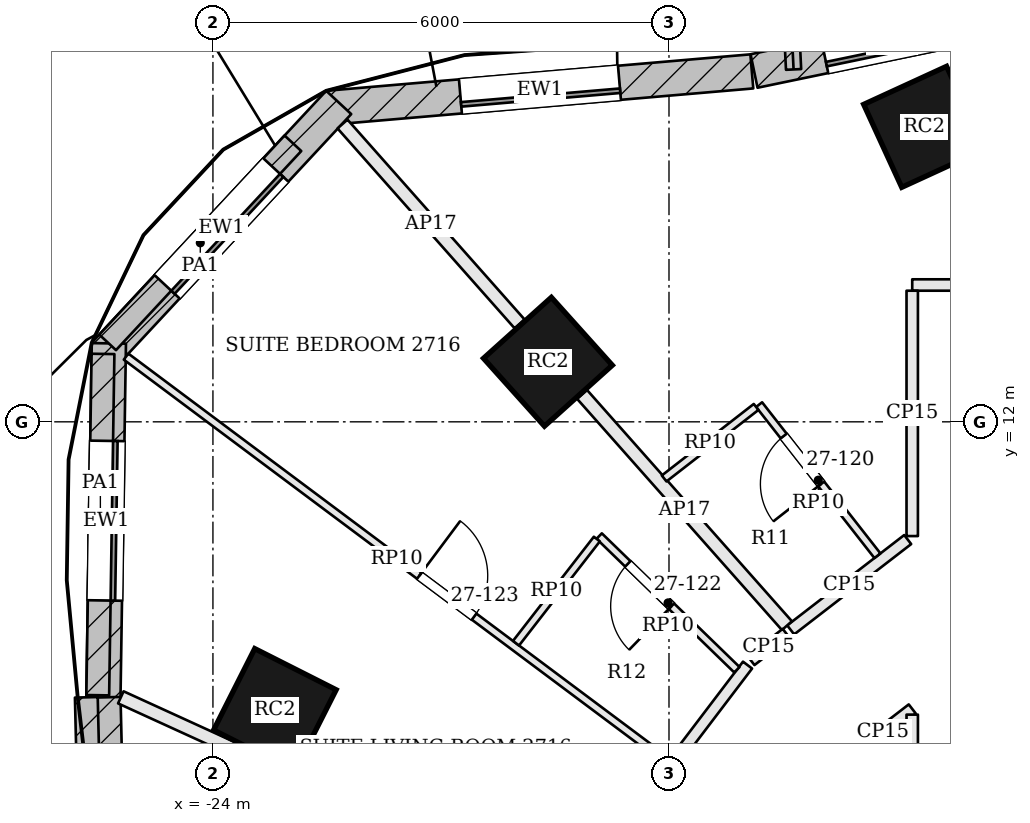
"""IFC4 building model, lengths in metres.
Left out: names, types, materials, properties, quantities, classifications, styles, units other than length and angle.
Written with IfcOpenShell. Run it as: python <this file> out.ifc"""

import sys

from ifc_helpers import new_model, si_unit, direction, frame, frame_2d, origin, origin_2d, place, context, subcontext, project, spatial, rectangle, extrude, element, fill, save


model = new_model("IFC4")
c1 = context("Model", 3, precision=1e-05, world=origin(), true_north=direction((0.0, 1.0)))
c2 = subcontext(c1, "Body", "Model", "MODEL_VIEW")
j1 = project(units=[si_unit("LENGTHUNIT", "METRE"), si_unit("PLANEANGLEUNIT", "RADIAN")], contexts=[c1])
p1 = place(None, origin())
s1 = spatial("IfcSite", under=j1, at=p1, CompositionType="ELEMENT")
p2 = place(p1, origin())
s2 = spatial("IfcBuilding", under=s1, at=p2, CompositionType="ELEMENT")
p3 = place(p2, frame((0.0, 0.0, 114.0)))
s3 = spatial("IfcBuildingStorey", under=s2, at=p3, CompositionType="ELEMENT", Elevation=114.0)
for number, where, z_axis, x_axis in (
    (1, (-14.643, 15.881, 0.0), (0.0, 0.0, 1.0), (-0.909, -0.417, 0.0)),
    (2, (-19.593, 12.79, 0.0), (0.0, 0.0, 1.0), (-0.744, -0.668, 0.0)),
    (3, (-23.185, 8.21, 0.0), (0.0, 0.0, 1.0), (-0.451, -0.893, 0.0)),
):
    element("IfcColumn", number, at=place(p3, frame(where, z_axis=z_axis, x_axis=x_axis)), inside=s3, PredefinedType="COLUMN", context=c2, shape_type="SweptSolid", body=[
        extrude(rectangle(XDim=1.2, YDim=1.2, at=origin_2d()), origin(), (0.0, 0.0, 1.0), 3.6),
    ])
p4 = place(p3, frame((-13.258, 17.367, 0.0), z_axis=(0.0, 0.0, 1.0), x_axis=(-0.97914968674, -0.203140077183, 0.0)))
e4 = element("IfcWall", 4, at=p4, inside=s3, PredefinedType="SOLIDWALL", context=c2, shape_type="SweptSolid", body=[
    extrude(rectangle(XDim=3.7, YDim=0.45, at=frame_2d((1.85, 0.0))), origin(), (0.0, 0.0, 1.0), 3.4),
])
p5 = place(p4, frame((0.95, 0.0, 0.9)))
e5 = element("IfcOpeningElement", 5, at=p5, cuts=e4, PredefinedType="OPENING", context=c2, shape_type="SweptSolid", body=[
    extrude(rectangle(XDim=1.8, YDim=2.0, at=frame_2d((0.9, 1.0))), frame((0.0, 0.235, 0.0), z_axis=(0.0, -1.0, 0.0), x_axis=(1.0, 0.0, 0.0)), (0.0, 0.0, 1.0), 0.47),
])
p6 = place(p3, frame((-16.91, 16.61, 0.0), z_axis=(0.0, 0.0, 1.0), x_axis=(-0.996333165816, -0.085558299972, 0.0)))
e6 = element("IfcWall", 6, at=p6, inside=s3, PredefinedType="SOLIDWALL", context=c2, shape_type="SweptSolid", body=[
    extrude(rectangle(XDim=5.596, YDim=0.45, at=frame_2d((2.798, 0.0))), origin(), (0.0, 0.0, 1.0), 3.4),
])
p7 = place(p6, frame((1.748, 0.0, 0.9)))
e7 = element("IfcOpeningElement", 7, at=p7, cuts=e6, PredefinedType="OPENING", context=c2, shape_type="SweptSolid", body=[
    extrude(rectangle(XDim=2.1, YDim=2.0, at=frame_2d((1.05, 1.0))), frame((0.0, 0.235, 0.0), z_axis=(0.0, -1.0, 0.0), x_axis=(1.0, 0.0, 0.0)), (0.0, 0.0, 1.0), 0.47),
])
p8 = place(p3, frame((-22.345, 16.202, 0.0), z_axis=(0.0, 0.0, 1.0), x_axis=(-0.681249161265, -0.732051624051, 0.0)))
e8 = element("IfcWall", 8, at=p8, inside=s3, PredefinedType="SOLIDWALL", context=c2, shape_type="SweptSolid", body=[
    extrude(rectangle(XDim=4.527, YDim=0.45, at=frame_2d((2.263, 0.0))), origin(), (0.0, 0.0, 1.0), 3.4),
])
p9 = place(p8, frame((1.213, 0.0, 0.9)))
e9 = element("IfcOpeningElement", 9, at=p9, cuts=e8, PredefinedType="OPENING", context=c2, shape_type="SweptSolid", body=[
    extrude(rectangle(XDim=2.1, YDim=2.0, at=frame_2d((1.05, 1.0))), frame((0.0, 0.235, 0.0), z_axis=(0.0, -1.0, 0.0), x_axis=(1.0, 0.0, 0.0)), (0.0, 0.0, 1.0), 0.47),
])
p10 = place(p3, frame((-25.369, 13.032, 0.0), z_axis=(0.0, 0.0, 1.0), x_axis=(-0.015383599855, -0.999881665426, 0.0)))
e10 = element("IfcWall", 10, at=p10, inside=s3, PredefinedType="SOLIDWALL", context=c2, shape_type="SweptSolid", body=[
    extrude(rectangle(XDim=4.666, YDim=0.45, at=frame_2d((2.333, 0.0))), origin(), (0.0, 0.0, 1.0), 3.4),
])
p11 = place(p10, frame((1.283, 0.0, 0.9)))
e11 = element("IfcOpeningElement", 11, at=p11, cuts=e10, PredefinedType="OPENING", context=c2, shape_type="SweptSolid", body=[
    extrude(rectangle(XDim=2.1, YDim=2.0, at=frame_2d((1.05, 1.0))), frame((0.0, 0.235, 0.0), z_axis=(0.0, -1.0, 0.0), x_axis=(1.0, 0.0, 0.0)), (0.0, 0.0, 1.0), 0.47),
])
p12 = place(p3, frame((-25.441, 8.375, 0.0), z_axis=(0.0, 0.0, 1.0), x_axis=(0.024385850259, -0.999702620936, 0.0)))
e12 = element("IfcWall", 12, at=p12, inside=s3, PredefinedType="SOLIDWALL", context=c2, shape_type="SweptSolid", body=[
    extrude(rectangle(XDim=4.165, YDim=0.45, at=frame_2d((2.083, 0.0))), origin(), (0.0, 0.0, 1.0), 3.4),
])
p13 = place(p12, frame((1.032, 0.0, 0.9)))
e13 = element("IfcOpeningElement", 13, at=p13, cuts=e12, PredefinedType="OPENING", context=c2, shape_type="SweptSolid", body=[
    extrude(rectangle(XDim=2.1, YDim=2.0, at=frame_2d((1.05, 1.0))), frame((0.0, 0.235, 0.0), z_axis=(0.0, -1.0, 0.0), x_axis=(1.0, 0.0, 0.0)), (0.0, 0.0, 1.0), 0.47),
])
p14 = place(p3, frame((-16.361, 16.636, 0.0), z_axis=(0.0, 0.0, 1.0), x_axis=(-0.048552811097, 0.998820616795, 0.0)))
e14 = element("IfcWall", 14, at=p14, inside=s3, PredefinedType="SOLIDWALL", context=c2, shape_type="SweptSolid", body=[
    extrude(rectangle(XDim=1.75, YDim=0.2, at=frame_2d((0.875, 0.0))), origin(), (0.0, 0.0, 1.0), 3.4),
])
p15 = place(p3, frame((-22.948, 15.665, 3.6), z_axis=(0.0, 0.0, 1.0), x_axis=(-0.681269800001, -0.732032417046, 0.0)))
e15 = element("IfcWall", 15, at=p15, inside=s3, PredefinedType="PARAPET", context=c2, shape_type="SweptSolid", body=[
    extrude(rectangle(XDim=3.578, YDim=0.3, at=frame_2d((1.789, 0.0))), origin(), (0.0, 0.0, 1.0), 1.1),
])
p16 = place(p3, frame((-25.446, 12.893, 3.6), z_axis=(0.0, 0.0, 1.0), x_axis=(-0.015386139974, -0.999881626342, 0.0)))
e16 = element("IfcWall", 16, at=p16, inside=s3, PredefinedType="PARAPET", context=c2, shape_type="SweptSolid", body=[
    extrude(rectangle(XDim=4.49, YDim=0.3, at=frame_2d((2.245, 0.0))), origin(), (0.0, 0.0, 1.0), 1.1),
])
p17 = place(p3, frame((-25.666, 8.376, 3.6), z_axis=(0.0, 0.0, 1.0), x_axis=(0.024357650064, -0.999703308429, 0.0)))
e17 = element("IfcWall", 17, at=p17, inside=s3, PredefinedType="PARAPET", context=c2, shape_type="SweptSolid", body=[
    extrude(rectangle(XDim=1.644, YDim=0.3, at=frame_2d((0.822, 0.0))), origin(), (0.0, 0.0, 1.0), 1.1),
])
p18 = place(p3, frame((-6.123, 13.8, 0.0), z_axis=(0.0, 0.0, 1.0), x_axis=(-1.0, 0.0, 0.0)))
e18 = element("IfcWall", 18, at=p18, inside=s3, PredefinedType="PARTITIONING", context=c2, shape_type="SweptSolid", body=[
    extrude(rectangle(XDim=8.677, YDim=0.15, at=frame_2d((4.339, 0.0))), origin(), (0.0, 0.0, 1.0), 2.784),
])
p19 = place(p18, frame((5.763, 0.0, 0.0)))
e19 = element("IfcOpeningElement", 19, at=p19, cuts=e18, PredefinedType="OPENING", context=c2, shape_type="SweptSolid", body=[
    extrude(rectangle(XDim=0.9, YDim=2.4, at=frame_2d((0.45, 1.2))), frame((0.0, 0.085, 0.0), z_axis=(0.0, -1.0, 0.0), x_axis=(1.0, 0.0, 0.0)), (0.0, 0.0, 1.0), 0.17),
])
p20 = place(p3, frame((-14.8, 13.725, 0.0), z_axis=(0.0, 0.0, 1.0), x_axis=(0.0, -1.0, 0.0)))
e20 = element("IfcWall", 20, at=p20, inside=s3, PredefinedType="PARTITIONING", context=c2, shape_type="SweptSolid", body=[
    extrude(rectangle(XDim=3.228, YDim=0.15, at=frame_2d((1.614, 0.0))), origin(), (0.0, 0.0, 1.0), 2.784),
])
p21 = place(p3, frame((-14.86, 10.451, 0.0), z_axis=(0.0, 0.0, 1.0), x_axis=(-0.791530658389, -0.611129459959, 0.0)))
e21 = element("IfcWall", 21, at=p21, inside=s3, PredefinedType="PARTITIONING", context=c2, shape_type="SweptSolid", body=[
    extrude(rectangle(XDim=1.945, YDim=0.15, at=frame_2d((0.972, 0.0))), origin(), (0.0, 0.0, 1.0), 2.784),
])
p22 = place(p3, frame((-22.295, 15.918, 0.0), z_axis=(0.0, 0.0, 1.0), x_axis=(0.663107572679, -0.748524112541, 0.0)))
e22 = element("IfcWall", 22, at=p22, inside=s3, PredefinedType="PARTITIONING", context=c2, shape_type="SweptSolid", body=[
    extrude(rectangle(XDim=3.513, YDim=0.175, at=frame_2d((1.756, 0.0))), origin(), (0.0, 0.0, 1.0), 2.784),
])
p23 = place(p3, frame((-19.143, 12.36, 0.0), z_axis=(0.0, 0.0, 1.0), x_axis=(0.663132391124, -0.748502125476, 0.0)))
e23 = element("IfcWall", 23, at=p23, inside=s3, PredefinedType="PARTITIONING", context=c2, shape_type="SweptSolid", body=[
    extrude(rectangle(XDim=4.064, YDim=0.175, at=frame_2d((2.032, 0.0))), origin(), (0.0, 0.0, 1.0), 2.784),
])
p24 = place(p3, frame((-16.458, 9.217, 0.0), z_axis=(0.0, 0.0, 1.0), x_axis=(-0.791661143807, -0.610960418837, 0.0)))
e24 = element("IfcWall", 24, at=p24, inside=s3, PredefinedType="PARTITIONING", context=c2, shape_type="SweptSolid", body=[
    extrude(rectangle(XDim=0.585, YDim=0.15, at=frame_2d((0.292, 0.0))), origin(), (0.0, 0.0, 1.0), 2.784),
])
p25 = place(p3, frame((-16.967, 8.8, 0.0), z_axis=(0.0, 0.0, 1.0), x_axis=(-0.604991921991, -0.796231608469, 0.0)))
e25 = element("IfcWall", 25, at=p25, inside=s3, PredefinedType="PARTITIONING", context=c2, shape_type="SweptSolid", body=[
    extrude(rectangle(XDim=3.185, YDim=0.15, at=frame_2d((1.593, 0.0))), origin(), (0.0, 0.0, 1.0), 2.784),
])
p26 = place(p25, frame((1.935, 0.0, 0.0)))
e26 = element("IfcOpeningElement", 26, at=p26, cuts=e25, PredefinedType="OPENING", context=c2, shape_type="SweptSolid", body=[
    extrude(rectangle(XDim=1.0, YDim=2.1, at=frame_2d((0.5, 1.05))), frame((0.0, 0.085, 0.0), z_axis=(0.0, -1.0, 0.0), x_axis=(1.0, 0.0, 0.0)), (0.0, 0.0, 1.0), 0.17),
])
p27 = place(p3, frame((-25.212, 8.375, 0.0), z_axis=(0.0, 0.0, 1.0), x_axis=(0.909561207786, -0.415569981219, 0.0)))
e27 = element("IfcWall", 27, at=p27, inside=s3, PredefinedType="PARTITIONING", context=c2, shape_type="SweptSolid", body=[
    extrude(rectangle(XDim=6.628, YDim=0.175, at=frame_2d((3.314, 0.0))), origin(), (0.0, 0.0, 1.0), 2.784),
])
p28 = place(p3, frame((-15.573, 7.626, 0.0), z_axis=(0.0, 0.0, 1.0), x_axis=(0.791581834002, 0.611063171921, 0.0)))
e28 = element("IfcWall", 28, at=p28, inside=s3, PredefinedType="PARTITIONING", context=c2, shape_type="SweptSolid", body=[
    extrude(rectangle(XDim=0.977, YDim=0.15, at=frame_2d((0.488, 0.0))), origin(), (0.0, 0.0, 1.0), 2.784),
])
p29 = place(p3, frame((-14.8, 8.148, 0.0), z_axis=(0.0, 0.0, 1.0), x_axis=(0.0, -1.0, 0.0)))
e29 = element("IfcWall", 29, at=p29, inside=s3, PredefinedType="PARTITIONING", context=c2, shape_type="SweptSolid", body=[
    extrude(rectangle(XDim=12.948, YDim=0.15, at=frame_2d((6.474, 0.0))), origin(), (0.0, 0.0, 1.0), 2.784),
])
p30 = place(p29, frame((5.536, 0.0, 0.0)))
e30 = element("IfcOpeningElement", 30, at=p30, cuts=e29, PredefinedType="OPENING", context=c2, shape_type="SweptSolid", body=[
    extrude(rectangle(XDim=1.8, YDim=2.1, at=frame_2d((0.9, 1.05))), frame((0.0, 0.085, 0.0), z_axis=(0.0, -1.0, 0.0), x_axis=(1.0, 0.0, 0.0)), (0.0, 0.0, 1.0), 0.17),
])
p31 = place(p3, frame((-15.258, 10.238, 0.0), z_axis=(0.0, 0.0, 1.0), x_axis=(-0.616501171545, 0.787353989946, 0.0)))
e31 = element("IfcWall", 31, at=p31, inside=s3, PredefinedType="PARTITIONING", context=c2, shape_type="SweptSolid", body=[
    extrude(rectangle(XDim=2.525, YDim=0.1, at=frame_2d((1.262, 0.0))), origin(), (0.0, 0.0, 1.0), 2.884),
])
p32 = place(p31, frame((1.2, 0.0, 0.0)))
e32 = element("IfcOpeningElement", 32, at=p32, cuts=e31, PredefinedType="OPENING", context=c2, shape_type="SweptSolid", body=[
    extrude(rectangle(XDim=0.8, YDim=2.1, at=frame_2d((0.4, 1.05))), frame((0.0, 0.06, 0.0), z_axis=(0.0, -1.0, 0.0), x_axis=(1.0, 0.0, 0.0)), (0.0, 0.0, 1.0), 0.12),
])
p33 = place(p3, frame((-16.854, 12.196, 0.0), z_axis=(0.0, 0.0, 1.0), x_axis=(-0.789403675078, -0.613874447891, 0.0)))
e33 = element("IfcWall", 33, at=p33, inside=s3, PredefinedType="PARTITIONING", context=c2, shape_type="SweptSolid", body=[
    extrude(rectangle(XDim=1.533, YDim=0.1, at=frame_2d((0.766, 0.0))), origin(), (0.0, 0.0, 1.0), 2.884),
])
p34 = place(p3, frame((-25.143, 12.858, 0.0), z_axis=(0.0, 0.0, 1.0), x_axis=(0.801115721268, -0.598509482913, 0.0)))
e34 = element("IfcWall", 34, at=p34, inside=s3, PredefinedType="PARTITIONING", context=c2, shape_type="SweptSolid", body=[
    extrude(rectangle(XDim=8.89, YDim=0.1, at=frame_2d((4.445, 0.0))), origin(), (0.0, 0.0, 1.0), 2.884),
])
p35 = place(p34, frame((4.816, 0.0, 0.0)))
e35 = element("IfcOpeningElement", 35, at=p35, cuts=e34, PredefinedType="OPENING", context=c2, shape_type="SweptSolid", body=[
    extrude(rectangle(XDim=0.9, YDim=2.4, at=frame_2d((0.45, 1.2))), frame((0.0, 0.06, 0.0), z_axis=(0.0, -1.0, 0.0), x_axis=(1.0, 0.0, 0.0)), (0.0, 0.0, 1.0), 0.12),
])
p36 = place(p3, frame((-17.107, 8.738, 0.0), z_axis=(0.0, 0.0, 1.0), x_axis=(-0.717471254284, 0.696588113074, 0.0)))
e36 = element("IfcWall", 36, at=p36, inside=s3, PredefinedType="PARTITIONING", context=c2, shape_type="SweptSolid", body=[
    extrude(rectangle(XDim=2.525, YDim=0.1, at=frame_2d((1.263, 0.0))), origin(), (0.0, 0.0, 1.0), 2.884),
])
p37 = place(p36, frame((1.2, 0.0, 0.0)))
e37 = element("IfcOpeningElement", 37, at=p37, cuts=e36, PredefinedType="OPENING", context=c2, shape_type="SweptSolid", body=[
    extrude(rectangle(XDim=0.8, YDim=2.1, at=frame_2d((0.4, 1.05))), frame((0.0, 0.06, 0.0), z_axis=(0.0, -1.0, 0.0), x_axis=(1.0, 0.0, 0.0)), (0.0, 0.0, 1.0), 0.12),
])
p38 = place(p3, frame((-18.949, 10.458, 0.0), z_axis=(0.0, 0.0, 1.0), x_axis=(-0.613092531391, -0.790011106221, 0.0)))
e38 = element("IfcWall", 38, at=p38, inside=s3, PredefinedType="PARTITIONING", context=c2, shape_type="SweptSolid", body=[
    extrude(rectangle(XDim=1.735, YDim=0.1, at=frame_2d((0.867, 0.0))), origin(), (0.0, 0.0, 1.0), 2.884),
])
p39 = place(p5, origin())
e39 = element("IfcWindow", 39, at=p39, inside=s3, PartitioningType="SINGLE_PANEL", PredefinedType="WINDOW", context=c2, shape_type="SweptSolid", body=[
    extrude(rectangle(XDim=1.8, YDim=2.0, at=frame_2d((0.9, 1.0))), frame((0.0, 0.135, 0.0), z_axis=(0.0, -1.0, 0.0), x_axis=(1.0, 0.0, 0.0)), (0.0, 0.0, 1.0), 0.06),
])
fill(e5, e39)
p40 = place(p7, origin())
e40 = element("IfcWindow", 40, at=p40, inside=s3, PartitioningType="SINGLE_PANEL", PredefinedType="WINDOW", context=c2, shape_type="SweptSolid", body=[
    extrude(rectangle(XDim=2.1, YDim=2.0, at=frame_2d((1.05, 1.0))), frame((0.0, 0.135, 0.0), z_axis=(0.0, -1.0, 0.0), x_axis=(1.0, 0.0, 0.0)), (0.0, 0.0, 1.0), 0.06),
])
fill(e7, e40)
p41 = place(p9, origin())
e41 = element("IfcWindow", 41, at=p41, inside=s3, PartitioningType="SINGLE_PANEL", PredefinedType="WINDOW", context=c2, shape_type="SweptSolid", body=[
    extrude(rectangle(XDim=2.1, YDim=2.0, at=frame_2d((1.05, 1.0))), frame((0.0, 0.135, 0.0), z_axis=(0.0, -1.0, 0.0), x_axis=(1.0, 0.0, 0.0)), (0.0, 0.0, 1.0), 0.06),
])
fill(e9, e41)
p42 = place(p11, origin())
e42 = element("IfcWindow", 42, at=p42, inside=s3, PartitioningType="SINGLE_PANEL", PredefinedType="WINDOW", context=c2, shape_type="SweptSolid", body=[
    extrude(rectangle(XDim=2.1, YDim=2.0, at=frame_2d((1.05, 1.0))), frame((0.0, 0.135, 0.0), z_axis=(0.0, -1.0, 0.0), x_axis=(1.0, 0.0, 0.0)), (0.0, 0.0, 1.0), 0.06),
])
fill(e11, e42)
p43 = place(p32, origin())
e43 = element("IfcDoor", 43, at=p43, inside=s3, OperationType="SINGLE_SWING_LEFT", PredefinedType="DOOR", context=c2, shape_type="SweptSolid", body=[
    extrude(rectangle(XDim=0.8, YDim=2.1, at=frame_2d((0.4, 1.05))), frame((0.0, 0.025, 0.0), z_axis=(0.0, -1.0, 0.0), x_axis=(1.0, 0.0, 0.0)), (0.0, 0.0, 1.0), 0.05),
])
fill(e32, e43)
p44 = place(p37, origin())
e44 = element("IfcDoor", 44, at=p44, inside=s3, OperationType="SINGLE_SWING_LEFT", PredefinedType="DOOR", context=c2, shape_type="SweptSolid", body=[
    extrude(rectangle(XDim=0.8, YDim=2.1, at=frame_2d((0.4, 1.05))), frame((0.0, 0.025, 0.0), z_axis=(0.0, -1.0, 0.0), x_axis=(1.0, 0.0, 0.0)), (0.0, 0.0, 1.0), 0.05),
])
fill(e37, e44)
p45 = place(p35, origin())
e45 = element("IfcDoor", 45, at=p45, inside=s3, OperationType="SINGLE_SWING_LEFT", PredefinedType="DOOR", context=c2, shape_type="SweptSolid", body=[
    extrude(rectangle(XDim=0.9, YDim=2.4, at=frame_2d((0.45, 1.2))), frame((0.0, 0.025, 0.0), z_axis=(0.0, -1.0, 0.0), x_axis=(1.0, 0.0, 0.0)), (0.0, 0.0, 1.0), 0.05),
])
fill(e35, e45)
save(model, sys.argv[1])
